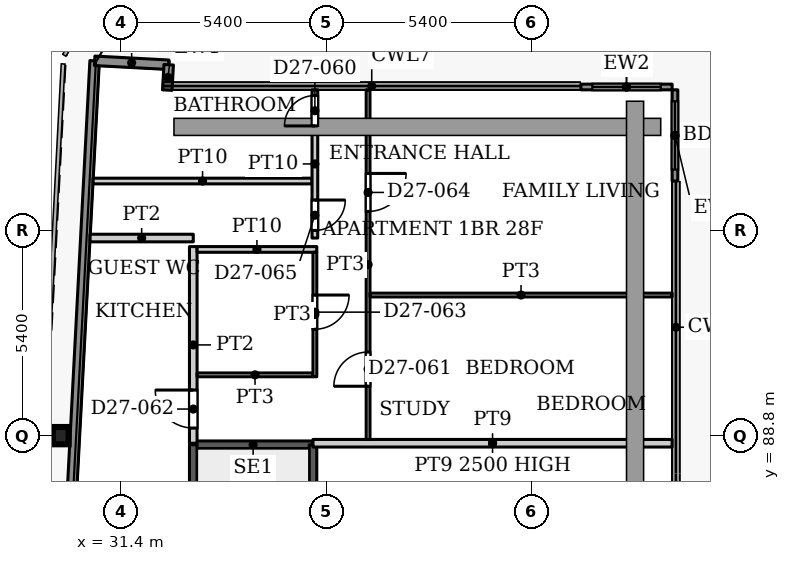
"""IFC4 building model, lengths in metres.
Left out: names, types, materials, properties, quantities, classifications, styles, units other than length and angle.
Written with IfcOpenShell. Run it as: python <this file> out.ifc"""

import sys

from ifc_helpers import new_model, si_unit, direction, frame, frame_2d, origin, origin_2d, place, context, subcontext, project, spatial, rectangle, i_section, extrude, source, transform, mapped, element, fill, save


model = new_model("IFC4")
c1 = context("Model", 3, precision=1e-05, world=origin(), true_north=direction((0.0, 1.0)))
c2 = subcontext(c1, "Body", "Model", "MODEL_VIEW")
j1 = project(units=[si_unit("LENGTHUNIT", "METRE"), si_unit("PLANEANGLEUNIT", "RADIAN")], contexts=[c1])
p1 = place(None, origin())
s1 = spatial("IfcSite", under=j1, at=p1, CompositionType="ELEMENT")
p2 = place(p1, origin())
s2 = spatial("IfcBuilding", under=s1, at=p2, CompositionType="ELEMENT")
p3 = place(p2, frame((0.0, 0.0, 121.4)))
s3 = spatial("IfcBuildingStorey", under=s2, at=p3, CompositionType="ELEMENT", Elevation=121.4)
p4 = place(p3, frame((29.811, 88.8, 0.0), z_axis=(0.0, 0.0, 1.0), x_axis=(1.0, 0.0, 0.0)))
e1 = element("IfcColumn", 1, at=p4, inside=s3, PredefinedType="COLUMN", context=c2, shape_type="SweptSolid", body=[
    extrude(i_section(OverallWidth=0.418, OverallDepth=0.455, WebThickness=0.042, FlangeThickness=0.068, FilletRadius=0.014, at=origin_2d()), origin(), (0.0, 0.0, 1.0), 3.9),
])
p5 = place(p3, frame((27.195, 31.969, 0.0), z_axis=(0.0, 0.0, 1.0), x_axis=(0.052554995867, 0.998618031286, 0.0)))
e2 = element("IfcWall", 2, at=p5, inside=s3, PredefinedType="SOLIDWALL", context=c2, shape_type="SweptSolid", body=[
    extrude(rectangle(XDim=66.787, YDim=0.25, at=frame_2d((33.394, 0.0))), origin(), (0.0, 0.0, 1.0), 3.75),
])
p6 = place(p3, frame((30.705, 98.664, 0.0), z_axis=(0.0, 0.0, 1.0), x_axis=(0.998577785791, -0.053314216913, 0.0)))
e3 = element("IfcWall", 3, at=p6, inside=s3, PredefinedType="SOLIDWALL", context=c2, shape_type="SweptSolid", body=[
    extrude(rectangle(XDim=1.951, YDim=0.25, at=frame_2d((0.975, 0.0))), origin(), (0.0, 0.0, 1.0), 3.75),
])
p7 = place(p3, frame((32.653, 98.56, 0.0), z_axis=(0.0, 0.0, 1.0), x_axis=(-0.054093451632, -0.998535877418, 0.0)))
e4 = element("IfcWall", 4, at=p7, inside=s3, PredefinedType="SOLIDWALL", context=c2, shape_type="SweptSolid", body=[
    extrude(rectangle(XDim=0.668, YDim=0.25, at=frame_2d((0.334, 0.0))), origin(), (0.0, 0.0, 1.0), 3.75),
])
p8 = place(p3, frame((43.5, 97.975, 0.0), z_axis=(0.0, 0.0, 1.0), x_axis=(1.0, 0.0, 0.0)))
e5 = element("IfcWall", 5, at=p8, inside=s3, PredefinedType="SOLIDWALL", context=c2, shape_type="SweptSolid", body=[
    extrude(rectangle(XDim=2.4, YDim=0.15, at=frame_2d((1.2, 0.0))), origin(), (0.0, 0.0, 1.0), 3.75),
])
p9 = place(p8, frame((0.3, 0.0, 0.0)))
e6 = element("IfcOpeningElement", 6, at=p9, cuts=e5, PredefinedType="OPENING", context=c2, shape_type="SweptSolid", body=[
    extrude(rectangle(XDim=1.8, YDim=2.4, at=frame_2d((0.9, 1.2))), frame((0.0, 0.085, 0.0), z_axis=(0.0, -1.0, 0.0), x_axis=(1.0, 0.0, 0.0)), (0.0, 0.0, 1.0), 0.17),
])
p10 = place(p3, frame((45.975, 97.9, 0.0), z_axis=(0.0, 0.0, 1.0), x_axis=(0.0, -1.0, 0.0)))
e7 = element("IfcWall", 7, at=p10, inside=s3, PredefinedType="SOLIDWALL", context=c2, shape_type="SweptSolid", body=[
    extrude(rectangle(XDim=2.4, YDim=0.15, at=frame_2d((1.2, 0.0))), origin(), (0.0, 0.0, 1.0), 3.75),
])
p11 = place(p10, frame((0.3, 0.0, 0.0)))
e8 = element("IfcOpeningElement", 8, at=p11, cuts=e7, PredefinedType="OPENING", context=c2, shape_type="SweptSolid", body=[
    extrude(rectangle(XDim=1.8, YDim=2.4, at=frame_2d((0.9, 1.2))), frame((0.0, 0.085, 0.0), z_axis=(0.0, -1.0, 0.0), x_axis=(1.0, 0.0, 0.0)), (0.0, 0.0, 1.0), 0.17),
])
p12 = place(p3, frame((33.3, 88.56, 0.0), z_axis=(0.0, 0.0, 1.0), x_axis=(1.0, 0.0, 0.0)))
e9 = element("IfcWall", 9, at=p12, inside=s3, PredefinedType="SHEAR", context=c2, shape_type="SweptSolid", body=[
    extrude(rectangle(XDim=3.15, YDim=0.2, at=frame_2d((1.575, 0.0))), origin(), (0.0, 0.0, 1.0), 3.9),
])
p13 = place(p3, frame((33.3, 79.4, 0.0), z_axis=(0.0, 0.0, 1.0), x_axis=(0.0, 1.0, 0.0)))
e10 = element("IfcWall", 10, at=p13, inside=s3, PredefinedType="SHEAR", context=c2, shape_type="SweptSolid", body=[
    extrude(rectangle(XDim=9.16, YDim=0.2, at=frame_2d((4.58, 0.0))), origin(), (0.0, 0.0, 1.0), 3.9),
])
p14 = place(p13, frame((0.35, 0.0, 0.0)))
e11 = element("IfcOpeningElement", 11, at=p14, cuts=e10, PredefinedType="OPENING", context=c2, shape_type="SweptSolid", body=[
    extrude(rectangle(XDim=1.1, YDim=2.2, at=frame_2d((0.55, 1.1))), frame((0.0, 0.11, 0.0), z_axis=(0.0, -1.0, 0.0), x_axis=(1.0, 0.0, 0.0)), (0.0, 0.0, 1.0), 0.22),
])
p15 = place(p3, frame((36.45, 79.4, 0.0), z_axis=(0.0, 0.0, 1.0), x_axis=(0.0, 1.0, 0.0)))
e12 = element("IfcWall", 12, at=p15, inside=s3, PredefinedType="SHEAR", context=c2, shape_type="SweptSolid", body=[
    extrude(rectangle(XDim=9.16, YDim=0.2, at=frame_2d((4.58, 0.0))), origin(), (0.0, 0.0, 1.0), 3.9),
])
p16 = place(p3, frame((30.664, 95.5, 0.0), z_axis=(0.0, 0.0, 1.0), x_axis=(1.0, 0.0, 0.0)))
e13 = element("IfcWall", 13, at=p16, inside=s3, PredefinedType="PARTITIONING", context=c2, shape_type="SweptSolid", body=[
    extrude(rectangle(XDim=5.761, YDim=0.15, at=frame_2d((2.88, 0.0))), origin(), (0.0, 0.0, 1.0), 3.6),
])
p17 = place(p3, frame((30.585, 94.0, 0.0), z_axis=(0.0, 0.0, 1.0), x_axis=(1.0, 0.0, 0.0)))
e14 = element("IfcWall", 14, at=p17, inside=s3, PredefinedType="PARTITIONING", context=c2, shape_type="SweptSolid", body=[
    extrude(rectangle(XDim=2.715, YDim=0.2, at=frame_2d((1.358, 0.0))), origin(), (0.0, 0.0, 1.0), 3.6),
])
p18 = place(p3, frame((33.3, 88.6, 0.0), z_axis=(0.0, 0.0, 1.0), x_axis=(0.0, 1.0, 0.0)))
e15 = element("IfcWall", 15, at=p18, inside=s3, PredefinedType="PARTITIONING", context=c2, shape_type="SweptSolid", body=[
    extrude(rectangle(XDim=5.175, YDim=0.2, at=frame_2d((2.587, 0.0))), origin(), (0.0, 0.0, 1.0), 3.6),
])
p19 = place(p18, frame((0.4, 0.0, 0.0)))
e16 = element("IfcOpeningElement", 16, at=p19, cuts=e15, PredefinedType="OPENING", context=c2, shape_type="SweptSolid", body=[
    extrude(rectangle(XDim=1.0, YDim=2.1, at=frame_2d((0.5, 1.05))), frame((0.0, 0.11, 0.0), z_axis=(0.0, -1.0, 0.0), x_axis=(1.0, 0.0, 0.0)), (0.0, 0.0, 1.0), 0.22),
])
p20 = place(p3, frame((33.4, 90.4, 0.0), z_axis=(0.0, 0.0, 1.0), x_axis=(1.0, 0.0, 0.0)))
e17 = element("IfcWall", 17, at=p20, inside=s3, PredefinedType="PARTITIONING", context=c2, shape_type="SweptSolid", body=[
    extrude(rectangle(XDim=3.05, YDim=0.1, at=frame_2d((1.525, 0.0))), origin(), (0.0, 0.0, 1.0), 3.6),
])
p21 = place(p3, frame((33.4, 93.7, 0.0), z_axis=(0.0, 0.0, 1.0), x_axis=(1.0, 0.0, 0.0)))
e18 = element("IfcWall", 18, at=p21, inside=s3, PredefinedType="PARTITIONING", context=c2, shape_type="SweptSolid", body=[
    extrude(rectangle(XDim=3.15, YDim=0.15, at=frame_2d((1.575, 0.0))), origin(), (0.0, 0.0, 1.0), 3.6),
])
p22 = place(p3, frame((36.45, 88.6, 0.0), z_axis=(0.0, 0.0, 1.0), x_axis=(1.0, 0.0, 0.0)))
e19 = element("IfcWall", 19, at=p22, inside=s3, PredefinedType="PARTITIONING", context=c2, shape_type="SweptSolid", body=[
    extrude(rectangle(XDim=9.45, YDim=0.2, at=frame_2d((4.725, 0.0))), origin(), (0.0, 0.0, 1.0), 2.5),
])
p23 = place(p3, frame((36.5, 90.35, 0.0), z_axis=(0.0, 0.0, 1.0), x_axis=(0.0, 1.0, 0.0)))
e20 = element("IfcWall", 20, at=p23, inside=s3, PredefinedType="PARTITIONING", context=c2, shape_type="SweptSolid", body=[
    extrude(rectangle(XDim=3.275, YDim=0.1, at=frame_2d((1.637, 0.0))), origin(), (0.0, 0.0, 1.0), 3.6),
])
p24 = place(p23, frame((1.25, 0.0, 0.0)))
e21 = element("IfcOpeningElement", 21, at=p24, cuts=e20, PredefinedType="OPENING", context=c2, shape_type="SweptSolid", body=[
    extrude(rectangle(XDim=0.9, YDim=2.1, at=frame_2d((0.45, 1.05))), frame((0.0, 0.06, 0.0), z_axis=(0.0, -1.0, 0.0), x_axis=(1.0, 0.0, 0.0)), (0.0, 0.0, 1.0), 0.12),
])
p25 = place(p3, frame((36.5, 94.0, 0.0), z_axis=(0.0, 0.0, 1.0), x_axis=(0.0, 1.0, 0.0)))
e22 = element("IfcWall", 22, at=p25, inside=s3, PredefinedType="PARTITIONING", context=c2, shape_type="SweptSolid", body=[
    extrude(rectangle(XDim=3.9, YDim=0.15, at=frame_2d((1.95, 0.0))), origin(), (0.0, 0.0, 1.0), 3.6),
])
p26 = place(p25, frame((2.95, 0.0, 0.0)))
e23 = element("IfcOpeningElement", 23, at=p26, cuts=e22, PredefinedType="OPENING", context=c2, shape_type="SweptSolid", body=[
    extrude(rectangle(XDim=0.8, YDim=2.1, at=frame_2d((0.4, 1.05))), frame((0.0, 0.085, 0.0), z_axis=(0.0, -1.0, 0.0), x_axis=(1.0, 0.0, 0.0)), (0.0, 0.0, 1.0), 0.17),
])
p27 = place(p25, frame((0.2, 0.0, 0.0)))
e24 = element("IfcOpeningElement", 24, at=p27, cuts=e22, PredefinedType="OPENING", context=c2, shape_type="SweptSolid", body=[
    extrude(rectangle(XDim=0.8, YDim=2.1, at=frame_2d((0.4, 1.05))), frame((0.0, 0.085, 0.0), z_axis=(0.0, -1.0, 0.0), x_axis=(1.0, 0.0, 0.0)), (0.0, 0.0, 1.0), 0.17),
])
p28 = place(p3, frame((37.9, 88.7, 0.0), z_axis=(0.0, 0.0, 1.0), x_axis=(0.0, 1.0, 0.0)))
e25 = element("IfcWall", 25, at=p28, inside=s3, PredefinedType="PARTITIONING", context=c2, shape_type="SweptSolid", body=[
    extrude(rectangle(XDim=9.2, YDim=0.1, at=frame_2d((4.6, 0.0))), origin(), (0.0, 0.0, 1.0), 3.6),
])
p29 = place(p28, frame((1.4, 0.0, 0.0)))
e26 = element("IfcOpeningElement", 26, at=p29, cuts=e25, PredefinedType="OPENING", context=c2, shape_type="SweptSolid", body=[
    extrude(rectangle(XDim=0.9, YDim=2.1, at=frame_2d((0.45, 1.05))), frame((0.0, 0.06, 0.0), z_axis=(0.0, -1.0, 0.0), x_axis=(1.0, 0.0, 0.0)), (0.0, 0.0, 1.0), 0.12),
])
p30 = place(p28, frame((6.0, 0.0, 0.0)))
e27 = element("IfcOpeningElement", 27, at=p30, cuts=e25, PredefinedType="OPENING", context=c2, shape_type="SweptSolid", body=[
    extrude(rectangle(XDim=1.0, YDim=2.1, at=frame_2d((0.5, 1.05))), frame((0.0, 0.06, 0.0), z_axis=(0.0, -1.0, 0.0), x_axis=(1.0, 0.0, 0.0)), (0.0, 0.0, 1.0), 0.12),
])
p31 = place(p3, frame((37.95, 92.5, 0.0), z_axis=(0.0, 0.0, 1.0), x_axis=(1.0, 0.0, 0.0)))
e28 = element("IfcWall", 28, at=p31, inside=s3, PredefinedType="PARTITIONING", context=c2, shape_type="SweptSolid", body=[
    extrude(rectangle(XDim=7.95, YDim=0.1, at=frame_2d((3.975, 0.0))), origin(), (0.0, 0.0, 1.0), 3.6),
])
m1 = source(origin(), c2, "Body", "SweptSolid", [
    extrude(rectangle(XDim=1.8, YDim=2.4, at=frame_2d((0.9, 1.2))), frame((0.0, 0.025, 0.0), z_axis=(0.0, -1.0, 0.0), x_axis=(1.0, 0.0, 0.0)), (0.0, 0.0, 1.0), 0.05),
])
p32 = place(p9, origin())
e29 = element("IfcDoor", 29, at=p32, inside=s3, OperationType="SLIDING_TO_LEFT", PredefinedType="DOOR", context=c2, shape_type="MappedRepresentation", body=[
    mapped(m1, transform((0.0, 0.0, 0.0), x_axis=(1.0, 0.0, 0.0), y_axis=(0.0, 1.0, 0.0), z_axis=(0.0, 0.0, 1.0), scale=1.0)),
])
fill(e6, e29)
p33 = place(p11, origin())
e30 = element("IfcDoor", 30, at=p33, inside=s3, OperationType="SLIDING_TO_LEFT", PredefinedType="DOOR", context=c2, shape_type="MappedRepresentation", body=[
    mapped(m1, transform((0.0, 0.0, 0.0), x_axis=(1.0, 0.0, 0.0), y_axis=(0.0, 1.0, 0.0), z_axis=(0.0, 0.0, 1.0), scale=1.0)),
])
fill(e8, e30)
m2 = source(origin(), c2, "Body", "SweptSolid", [
    extrude(rectangle(XDim=0.8, YDim=2.1, at=frame_2d((0.4, 1.05))), frame((0.0, 0.025, 0.0), z_axis=(0.0, -1.0, 0.0), x_axis=(1.0, 0.0, 0.0)), (0.0, 0.0, 1.0), 0.05),
])
p34 = place(p26, origin())
e31 = element("IfcDoor", 31, at=p34, inside=s3, OperationType="SINGLE_SWING_LEFT", PredefinedType="DOOR", context=c2, shape_type="MappedRepresentation", body=[
    mapped(m2, transform((0.0, 0.0, 0.0), x_axis=(1.0, 0.0, 0.0), y_axis=(0.0, 1.0, 0.0), z_axis=(0.0, 0.0, 1.0), scale=1.0)),
])
fill(e23, e31)
m3 = source(origin(), c2, "Body", "SweptSolid", [
    extrude(rectangle(XDim=0.9, YDim=2.1, at=frame_2d((0.45, 1.05))), frame((0.0, 0.025, 0.0), z_axis=(0.0, -1.0, 0.0), x_axis=(1.0, 0.0, 0.0)), (0.0, 0.0, 1.0), 0.05),
])
p35 = place(p29, origin())
e32 = element("IfcDoor", 32, at=p35, inside=s3, OperationType="SINGLE_SWING_LEFT", PredefinedType="DOOR", context=c2, shape_type="MappedRepresentation", body=[
    mapped(m3, transform((0.0, 0.0, 0.0), x_axis=(1.0, 0.0, 0.0), y_axis=(0.0, 1.0, 0.0), z_axis=(0.0, 0.0, 1.0), scale=1.0)),
])
fill(e26, e32)
m4 = source(origin(), c2, "Body", "SweptSolid", [
    extrude(rectangle(XDim=1.0, YDim=2.1, at=frame_2d((0.5, 1.05))), frame((0.0, 0.025, 0.0), z_axis=(0.0, -1.0, 0.0), x_axis=(1.0, 0.0, 0.0)), (0.0, 0.0, 1.0), 0.05),
])
p36 = place(p19, origin())
e33 = element("IfcDoor", 33, at=p36, inside=s3, OperationType="SINGLE_SWING_LEFT", PredefinedType="DOOR", context=c2, shape_type="MappedRepresentation", body=[
    mapped(m4, transform((0.0, 0.0, 0.0), x_axis=(1.0, 0.0, 0.0), y_axis=(0.0, 1.0, 0.0), z_axis=(0.0, 0.0, 1.0), scale=1.0)),
])
fill(e16, e33)
p37 = place(p24, origin())
e34 = element("IfcDoor", 34, at=p37, inside=s3, OperationType="SINGLE_SWING_RIGHT", PredefinedType="DOOR", context=c2, shape_type="MappedRepresentation", body=[
    mapped(m3, transform((0.0, 0.0, 0.0), x_axis=(1.0, 0.0, 0.0), y_axis=(0.0, 1.0, 0.0), z_axis=(0.0, 0.0, 1.0), scale=1.0)),
])
fill(e21, e34)
m5 = source(origin(), c2, "Body", "SweptSolid", [
    extrude(rectangle(XDim=1.0, YDim=2.1, at=frame_2d((0.5, 1.05))), frame((0.0, 0.025, 0.0), z_axis=(0.0, -1.0, 0.0), x_axis=(1.0, 0.0, 0.0)), (0.0, 0.0, 1.0), 0.05),
])
p38 = place(p30, origin())
e35 = element("IfcDoor", 35, at=p38, inside=s3, OperationType="SINGLE_SWING_RIGHT", PredefinedType="DOOR", context=c2, shape_type="MappedRepresentation", body=[
    mapped(m5, transform((0.0, 0.0, 0.0), x_axis=(1.0, 0.0, 0.0), y_axis=(0.0, 1.0, 0.0), z_axis=(0.0, 0.0, 1.0), scale=1.0)),
])
fill(e27, e35)
p39 = place(p27, origin())
e36 = element("IfcDoor", 36, at=p39, inside=s3, OperationType="SINGLE_SWING_RIGHT", PredefinedType="DOOR", context=c2, shape_type="MappedRepresentation", body=[
    mapped(m2, transform((0.0, 0.0, 0.0), x_axis=(1.0, 0.0, 0.0), y_axis=(0.0, 1.0, 0.0), z_axis=(0.0, 0.0, 1.0), scale=1.0)),
])
fill(e24, e36)
save(model, sys.argv[1])
